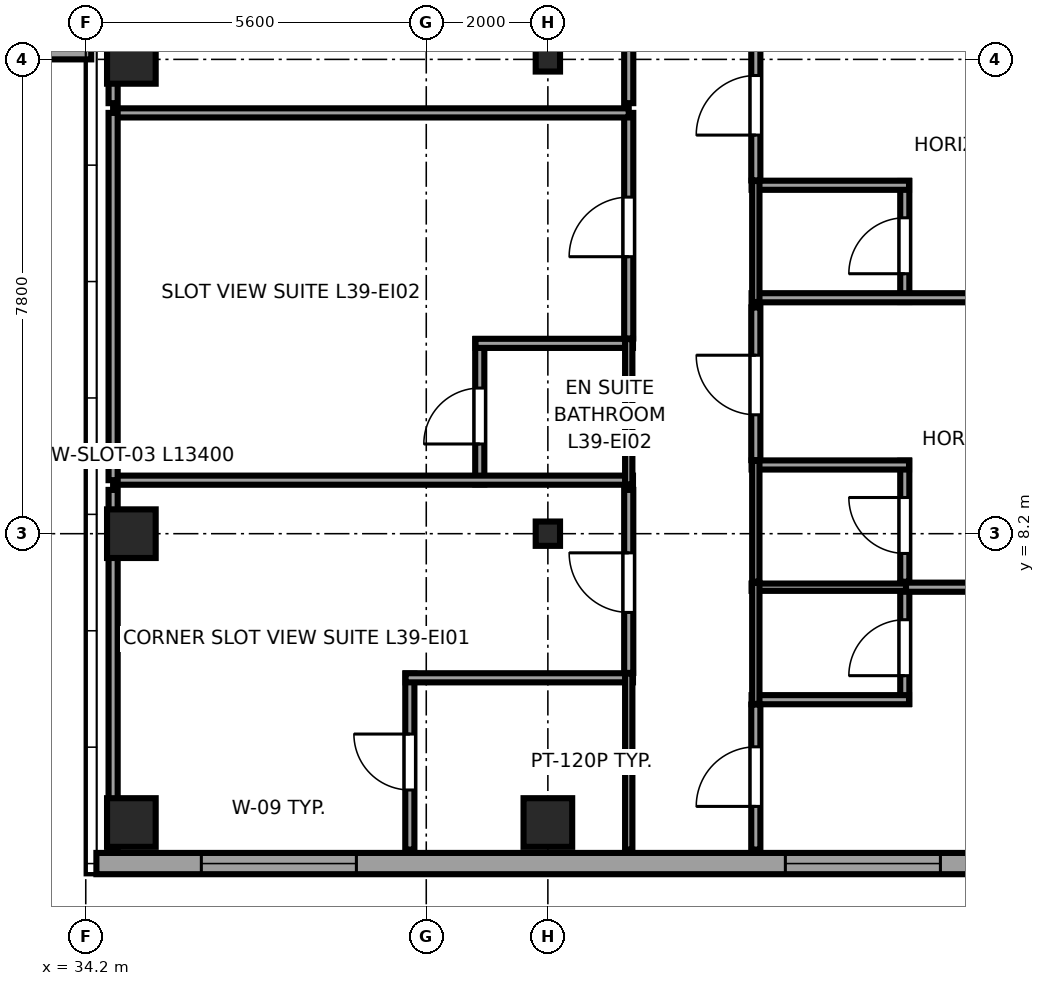
"""IFC4 building model, lengths in metres.
Left out: names, types, materials, properties, quantities, classifications, styles, units other than length and angle.
Written with IfcOpenShell. Run it as: python <this file> out.ifc"""

import sys

from ifc_helpers import new_model, si_unit, direction, frame, frame_2d, origin, origin_2d, place, context, subcontext, project, spatial, rectangle, i_section, extrude, source, transform, mapped, element, fill, save


model = new_model("IFC4")
c1 = context("Model", 3, precision=1e-05, world=origin(), true_north=direction((0.0, 1.0)))
c2 = subcontext(c1, "Body", "Model", "MODEL_VIEW")
j1 = project(units=[si_unit("LENGTHUNIT", "METRE"), si_unit("PLANEANGLEUNIT", "RADIAN")], contexts=[c1])
p1 = place(None, origin())
s1 = spatial("IfcSite", under=j1, at=p1, CompositionType="ELEMENT")
p2 = place(p1, origin())
s2 = spatial("IfcBuilding", under=s1, at=p2, CompositionType="ELEMENT")
p3 = place(p2, frame((0.0, 0.0, 150.6)))
s3 = spatial("IfcBuildingStorey", under=s2, at=p3, CompositionType="ELEMENT", Elevation=150.6)
m1 = source(origin(), c2, "Body", "SweptSolid", [
    extrude(rectangle(XDim=0.8, YDim=0.8, at=origin_2d()), origin(), (0.0, 0.0, 1.0), 3.55),
])
for number, where, z_axis, x_axis in (
    (1, (34.95, 3.45, 0.0), (0.0, 0.0, 1.0), (1.0, 0.0, 0.0)),
    (2, (34.95, 8.2, 0.0), (0.0, 0.0, 1.0), (1.0, 0.0, 0.0)),
    (3, (34.95, 16.0, 0.0), (0.0, 0.0, 1.0), (1.0, 0.0, 0.0)),
    (4, (41.8, 3.45, 0.0), (0.0, 0.0, 1.0), (1.0, 0.0, 0.0)),
):
    element("IfcColumn", number, at=place(p3, frame(where, z_axis=z_axis, x_axis=x_axis)), inside=s3, PredefinedType="COLUMN", context=c2, shape_type="MappedRepresentation", body=[
        mapped(m1, transform((0.0, 0.0, 0.0), x_axis=(1.0, 0.0, 0.0), y_axis=(0.0, 1.0, 0.0), z_axis=(0.0, 0.0, 1.0), scale=1.0)),
    ])
m2 = source(origin(), c2, "Body", "SweptSolid", [
    extrude(i_section(OverallWidth=0.4, OverallDepth=0.4, WebThickness=0.02, FlangeThickness=0.035, at=origin_2d()), origin(), (0.0, 0.0, 1.0), 3.55),
])
for number, where, z_axis, x_axis in (
    (5, (41.8, 8.2, 0.0), (0.0, 0.0, 1.0), (1.0, 0.0, 0.0)),
    (6, (41.8, 16.0, 0.0), (0.0, 0.0, 1.0), (1.0, 0.0, 0.0)),
):
    element("IfcColumn", number, at=place(p3, frame(where, z_axis=z_axis, x_axis=x_axis)), inside=s3, PredefinedType="COLUMN", context=c2, shape_type="MappedRepresentation", body=[
        mapped(m2, transform((0.0, 0.0, 0.0), x_axis=(1.0, 0.0, 0.0), y_axis=(0.0, 1.0, 0.0), z_axis=(0.0, 0.0, 1.0), scale=1.0)),
    ])
p4 = place(p3, frame((22.71, 16.175, 0.0), z_axis=(0.0, 0.0, 1.0), x_axis=(1.0, 0.0, 0.0)))
e7 = element("IfcWall", 7, at=p4, inside=s3, PredefinedType="SOLIDWALL", context=c2, shape_type="SweptSolid", body=[
    extrude(rectangle(XDim=11.58, YDim=0.35, at=frame_2d((5.79, 0.0))), origin(), (0.0, 0.0, 1.0), 2.16),
])
p5 = place(p3, frame((34.375, 2.775, 0.0), z_axis=(0.0, 0.0, 1.0), x_axis=(1.0, 0.0, 0.0)))
e8 = element("IfcWall", 8, at=p5, inside=s3, PredefinedType="SOLIDWALL", context=c2, shape_type="SweptSolid", body=[
    extrude(rectangle(XDim=15.608, YDim=0.35, at=frame_2d((7.804, 0.0))), origin(), (0.0, 0.0, 1.0), 3.37),
])
p6 = place(p5, frame((1.726, 0.0, 0.68)))
e9 = element("IfcOpeningElement", 9, at=p6, cuts=e8, PredefinedType="OPENING", context=c2, shape_type="SweptSolid", body=[
    extrude(rectangle(XDim=2.55, YDim=1.92, at=frame_2d((1.275, 0.96))), frame((0.0, 0.185, 0.0), z_axis=(0.0, -1.0, 0.0), x_axis=(1.0, 0.0, 0.0)), (0.0, 0.0, 1.0), 0.37),
])
p7 = place(p5, frame((11.331, 0.0, 0.68)))
e10 = element("IfcOpeningElement", 10, at=p7, cuts=e8, PredefinedType="OPENING", context=c2, shape_type="SweptSolid", body=[
    extrude(rectangle(XDim=2.55, YDim=1.92, at=frame_2d((1.275, 0.96))), frame((0.0, 0.185, 0.0), z_axis=(0.0, -1.0, 0.0), x_axis=(1.0, 0.0, 0.0)), (0.0, 0.0, 1.0), 0.37),
])
p8 = place(p3, frame((39.53, 3.005, 0.0), z_axis=(0.0, 0.0, 1.0), x_axis=(0.0, 1.0, 0.0)))
e11 = element("IfcWall", 11, at=p8, inside=s3, PredefinedType="PARTITIONING", context=c2, shape_type="SweptSolid", body=[
    extrude(rectangle(XDim=2.895, YDim=0.15, at=frame_2d((1.448, 0.0))), origin(), (0.0, 0.0, 1.0), 3.37),
])
p9 = place(p8, frame((0.98, 0.0, 0.0)))
e12 = element("IfcOpeningElement", 12, at=p9, cuts=e11, PredefinedType="OPENING", context=c2, shape_type="SweptSolid", body=[
    extrude(rectangle(XDim=0.92, YDim=2.01, at=frame_2d((0.46, 1.005))), frame((0.0, 0.085, 0.0), z_axis=(0.0, -1.0, 0.0), x_axis=(1.0, 0.0, 0.0)), (0.0, 0.0, 1.0), 0.17),
])
p10 = place(p3, frame((39.46, 5.83, 0.0), z_axis=(0.0, 0.0, 1.0), x_axis=(1.0, 0.0, 0.0)))
e13 = element("IfcWall", 13, at=p10, inside=s3, PredefinedType="PARTITIONING", context=c2, shape_type="SweptSolid", body=[
    extrude(rectangle(XDim=3.74, YDim=0.15, at=frame_2d((1.87, 0.0))), origin(), (0.0, 0.0, 1.0), 3.37),
])
p11 = place(p3, frame((43.13, 3.005, 0.0), z_axis=(0.0, 0.0, 1.0), x_axis=(0.0, 1.0, 0.0)))
e14 = element("IfcWall", 14, at=p11, inside=s3, PredefinedType="PLUMBINGWALL", context=c2, shape_type="SweptSolid", body=[
    extrude(rectangle(XDim=2.895, YDim=0.12, at=frame_2d((1.448, 0.0))), origin(), (0.0, 0.0, 1.0), 3.37),
])
p12 = place(p3, frame((40.68, 9.01, 0.0), z_axis=(0.0, 0.0, 1.0), x_axis=(0.0, 1.0, 0.0)))
e15 = element("IfcWall", 15, at=p12, inside=s3, PredefinedType="PARTITIONING", context=c2, shape_type="SweptSolid", body=[
    extrude(rectangle(XDim=2.39, YDim=0.15, at=frame_2d((1.195, 0.0))), origin(), (0.0, 0.0, 1.0), 3.37),
])
p13 = place(p12, frame((0.665, 0.0, 0.0)))
e16 = element("IfcOpeningElement", 16, at=p13, cuts=e15, PredefinedType="OPENING", context=c2, shape_type="SweptSolid", body=[
    extrude(rectangle(XDim=0.92, YDim=2.01, at=frame_2d((0.46, 1.005))), frame((0.0, 0.085, 0.0), z_axis=(0.0, -1.0, 0.0), x_axis=(1.0, 0.0, 0.0)), (0.0, 0.0, 1.0), 0.17),
])
p14 = place(p3, frame((34.65, 9.08, 0.0), z_axis=(0.0, 0.0, 1.0), x_axis=(1.0, 0.0, 0.0)))
e17 = element("IfcWall", 17, at=p14, inside=s3, PredefinedType="PARTITIONING", context=c2, shape_type="SweptSolid", body=[
    extrude(rectangle(XDim=8.55, YDim=0.15, at=frame_2d((4.275, 0.0))), origin(), (0.0, 0.0, 1.0), 3.37),
])
p15 = place(p3, frame((40.61, 11.33, 0.0), z_axis=(0.0, 0.0, 1.0), x_axis=(1.0, 0.0, 0.0)))
e18 = element("IfcWall", 18, at=p15, inside=s3, PredefinedType="PARTITIONING", context=c2, shape_type="SweptSolid", body=[
    extrude(rectangle(XDim=2.59, YDim=0.15, at=frame_2d((1.295, 0.0))), origin(), (0.0, 0.0, 1.0), 3.37),
])
p16 = place(p3, frame((43.13, 9.01, 0.0), z_axis=(0.0, 0.0, 1.0), x_axis=(0.0, 1.0, 0.0)))
e19 = element("IfcWall", 19, at=p16, inside=s3, PredefinedType="PLUMBINGWALL", context=c2, shape_type="SweptSolid", body=[
    extrude(rectangle(XDim=2.39, YDim=0.12, at=frame_2d((1.195, 0.0))), origin(), (0.0, 0.0, 1.0), 3.37),
])
p17 = place(p3, frame((47.67, 5.4, 0.0), z_axis=(0.0, 0.0, 1.0), x_axis=(0.0, 1.0, 0.0)))
e20 = element("IfcWall", 20, at=p17, inside=s3, PredefinedType="PARTITIONING", context=c2, shape_type="SweptSolid", body=[
    extrude(rectangle(XDim=1.99, YDim=0.15, at=frame_2d((0.995, 0.0))), origin(), (0.0, 0.0, 1.0), 3.37),
])
p18 = place(p17, frame((0.465, 0.0, 0.0)))
e21 = element("IfcOpeningElement", 21, at=p18, cuts=e20, PredefinedType="OPENING", context=c2, shape_type="SweptSolid", body=[
    extrude(rectangle(XDim=0.92, YDim=2.01, at=frame_2d((0.46, 1.005))), frame((0.0, 0.085, 0.0), z_axis=(0.0, -1.0, 0.0), x_axis=(1.0, 0.0, 0.0)), (0.0, 0.0, 1.0), 0.17),
])
p19 = place(p3, frame((45.15, 5.47, 0.0), z_axis=(0.0, 0.0, 1.0), x_axis=(1.0, 0.0, 0.0)))
e22 = element("IfcWall", 22, at=p19, inside=s3, PredefinedType="PARTITIONING", context=c2, shape_type="SweptSolid", body=[
    extrude(rectangle(XDim=2.59, YDim=0.15, at=frame_2d((1.295, 0.0))), origin(), (0.0, 0.0, 1.0), 3.37),
])
p20 = place(p3, frame((45.15, 7.32, 0.0), z_axis=(0.0, 0.0, 1.0), x_axis=(1.0, 0.0, 0.0)))
e23 = element("IfcWall", 23, at=p20, inside=s3, PredefinedType="PLUMBINGWALL", context=c2, shape_type="SweptSolid", body=[
    extrude(rectangle(XDim=2.59, YDim=0.12, at=frame_2d((1.295, 0.0))), origin(), (0.0, 0.0, 1.0), 3.37),
])
p21 = place(p3, frame((45.22, 5.4, 0.0), z_axis=(0.0, 0.0, 1.0), x_axis=(0.0, 1.0, 0.0)))
e24 = element("IfcWall", 24, at=p21, inside=s3, PredefinedType="PLUMBINGWALL", context=c2, shape_type="SweptSolid", body=[
    extrude(rectangle(XDim=1.99, YDim=0.12, at=frame_2d((0.995, 0.0))), origin(), (0.0, 0.0, 1.0), 3.37),
])
p22 = place(p3, frame((47.67, 7.41, 0.0), z_axis=(0.0, 0.0, 1.0), x_axis=(0.0, 1.0, 0.0)))
e25 = element("IfcWall", 25, at=p22, inside=s3, PredefinedType="PARTITIONING", context=c2, shape_type="SweptSolid", body=[
    extrude(rectangle(XDim=1.99, YDim=0.15, at=frame_2d((0.995, 0.0))), origin(), (0.0, 0.0, 1.0), 3.37),
])
p23 = place(p22, frame((0.465, 0.0, 0.0)))
e26 = element("IfcOpeningElement", 26, at=p23, cuts=e25, PredefinedType="OPENING", context=c2, shape_type="SweptSolid", body=[
    extrude(rectangle(XDim=0.92, YDim=2.01, at=frame_2d((0.46, 1.005))), frame((0.0, 0.085, 0.0), z_axis=(0.0, -1.0, 0.0), x_axis=(1.0, 0.0, 0.0)), (0.0, 0.0, 1.0), 0.17),
])
p24 = place(p3, frame((45.15, 9.33, 0.0), z_axis=(0.0, 0.0, 1.0), x_axis=(1.0, 0.0, 0.0)))
e27 = element("IfcWall", 27, at=p24, inside=s3, PredefinedType="PARTITIONING", context=c2, shape_type="SweptSolid", body=[
    extrude(rectangle(XDim=2.59, YDim=0.15, at=frame_2d((1.295, 0.0))), origin(), (0.0, 0.0, 1.0), 3.37),
])
p25 = place(p3, frame((45.22, 7.41, 0.0), z_axis=(0.0, 0.0, 1.0), x_axis=(0.0, 1.0, 0.0)))
e28 = element("IfcWall", 28, at=p25, inside=s3, PredefinedType="PLUMBINGWALL", context=c2, shape_type="SweptSolid", body=[
    extrude(rectangle(XDim=1.99, YDim=0.12, at=frame_2d((0.995, 0.0))), origin(), (0.0, 0.0, 1.0), 3.37),
])
p26 = place(p3, frame((47.67, 12.01, 0.0), z_axis=(0.0, 0.0, 1.0), x_axis=(0.0, 1.0, 0.0)))
e29 = element("IfcWall", 29, at=p26, inside=s3, PredefinedType="PARTITIONING", context=c2, shape_type="SweptSolid", body=[
    extrude(rectangle(XDim=1.99, YDim=0.15, at=frame_2d((0.995, 0.0))), origin(), (0.0, 0.0, 1.0), 3.37),
])
p27 = place(p26, frame((0.465, 0.0, 0.0)))
e30 = element("IfcOpeningElement", 30, at=p27, cuts=e29, PredefinedType="OPENING", context=c2, shape_type="SweptSolid", body=[
    extrude(rectangle(XDim=0.92, YDim=2.01, at=frame_2d((0.46, 1.005))), frame((0.0, 0.085, 0.0), z_axis=(0.0, -1.0, 0.0), x_axis=(1.0, 0.0, 0.0)), (0.0, 0.0, 1.0), 0.17),
])
p28 = place(p3, frame((45.15, 12.08, 0.0), z_axis=(0.0, 0.0, 1.0), x_axis=(1.0, 0.0, 0.0)))
e31 = element("IfcWall", 31, at=p28, inside=s3, PredefinedType="PARTITIONING", context=c2, shape_type="SweptSolid", body=[
    extrude(rectangle(XDim=8.845, YDim=0.15, at=frame_2d((4.423, 0.0))), origin(), (0.0, 0.0, 1.0), 3.37),
])
p29 = place(p3, frame((45.15, 13.93, 0.0), z_axis=(0.0, 0.0, 1.0), x_axis=(1.0, 0.0, 0.0)))
e32 = element("IfcWall", 32, at=p29, inside=s3, PredefinedType="PARTITIONING", context=c2, shape_type="SweptSolid", body=[
    extrude(rectangle(XDim=2.59, YDim=0.15, at=frame_2d((1.295, 0.0))), origin(), (0.0, 0.0, 1.0), 3.37),
])
p30 = place(p3, frame((45.22, 12.01, 0.0), z_axis=(0.0, 0.0, 1.0), x_axis=(0.0, 1.0, 0.0)))
e33 = element("IfcWall", 33, at=p30, inside=s3, PredefinedType="PLUMBINGWALL", context=c2, shape_type="SweptSolid", body=[
    extrude(rectangle(XDim=1.99, YDim=0.12, at=frame_2d((0.995, 0.0))), origin(), (0.0, 0.0, 1.0), 3.37),
])
p31 = place(p3, frame((43.13, 5.91, 0.0), z_axis=(0.0, 0.0, 1.0), x_axis=(0.0, 1.0, 0.0)))
e34 = element("IfcWall", 34, at=p31, inside=s3, PredefinedType="PARTITIONING", context=c2, shape_type="SweptSolid", body=[
    extrude(rectangle(XDim=3.01, YDim=0.15, at=frame_2d((1.505, 0.0))), origin(), (0.0, 0.0, 1.0), 3.37),
])
p32 = place(p31, frame((0.995, 0.0, 0.0)))
e35 = element("IfcOpeningElement", 35, at=p32, cuts=e34, PredefinedType="OPENING", context=c2, shape_type="SweptSolid", body=[
    extrude(rectangle(XDim=0.98, YDim=2.12, at=frame_2d((0.49, 1.06))), frame((0.0, 0.085, 0.0), z_axis=(0.0, -1.0, 0.0), x_axis=(1.0, 0.0, 0.0)), (0.0, 0.0, 1.0), 0.17),
])
p33 = place(p3, frame((34.65, 3.005, 0.0), z_axis=(0.0, 0.0, 1.0), x_axis=(0.0, 1.0, 0.0)))
e36 = element("IfcWall", 36, at=p33, inside=s3, PredefinedType="PARTITIONING", context=c2, shape_type="SweptSolid", body=[
    extrude(rectangle(XDim=5.915, YDim=0.15, at=frame_2d((2.958, 0.0))), origin(), (0.0, 0.0, 1.0), 2.16),
])
p34 = place(p3, frame((43.13, 11.41, 0.0), z_axis=(0.0, 0.0, 1.0), x_axis=(0.0, 1.0, 0.0)))
e37 = element("IfcWall", 37, at=p34, inside=s3, PredefinedType="PARTITIONING", context=c2, shape_type="SweptSolid", body=[
    extrude(rectangle(XDim=3.71, YDim=0.15, at=frame_2d((1.855, 0.0))), origin(), (0.0, 0.0, 1.0), 3.37),
])
p35 = place(p34, frame((1.345, 0.0, 0.0)))
e38 = element("IfcOpeningElement", 38, at=p35, cuts=e37, PredefinedType="OPENING", context=c2, shape_type="SweptSolid", body=[
    extrude(rectangle(XDim=0.98, YDim=2.12, at=frame_2d((0.49, 1.06))), frame((0.0, 0.085, 0.0), z_axis=(0.0, -1.0, 0.0), x_axis=(1.0, 0.0, 0.0)), (0.0, 0.0, 1.0), 0.17),
])
p36 = place(p3, frame((34.65, 15.12, 0.0), z_axis=(0.0, 0.0, 1.0), x_axis=(1.0, 0.0, 0.0)))
e39 = element("IfcWall", 39, at=p36, inside=s3, PredefinedType="PARTITIONING", context=c2, shape_type="SweptSolid", body=[
    extrude(rectangle(XDim=8.48, YDim=0.15, at=frame_2d((4.24, 0.0))), origin(), (0.0, 0.0, 1.0), 3.37),
])
p37 = place(p3, frame((34.65, 9.08, 0.0), z_axis=(0.0, 0.0, 1.0), x_axis=(0.0, 1.0, 0.0)))
e40 = element("IfcWall", 40, at=p37, inside=s3, PredefinedType="PARTITIONING", context=c2, shape_type="SweptSolid", body=[
    extrude(rectangle(XDim=6.04, YDim=0.15, at=frame_2d((3.02, 0.0))), origin(), (0.0, 0.0, 1.0), 2.16),
])
p38 = place(p3, frame((43.13, 15.28, 0.0), z_axis=(0.0, 0.0, 1.0), x_axis=(0.0, 1.0, 0.0)))
e41 = element("IfcWall", 41, at=p38, inside=s3, PredefinedType="PARTITIONING", context=c2, shape_type="SweptSolid", body=[
    extrude(rectangle(XDim=3.61, YDim=0.15, at=frame_2d((1.805, 0.0))), origin(), (0.0, 0.0, 1.0), 3.37),
])
p39 = place(p38, frame((1.295, 0.0, 0.0)))
e42 = element("IfcOpeningElement", 42, at=p39, cuts=e41, PredefinedType="OPENING", context=c2, shape_type="SweptSolid", body=[
    extrude(rectangle(XDim=0.98, YDim=2.12, at=frame_2d((0.49, 1.06))), frame((0.0, 0.085, 0.0), z_axis=(0.0, -1.0, 0.0), x_axis=(1.0, 0.0, 0.0)), (0.0, 0.0, 1.0), 0.17),
])
p40 = place(p3, frame((34.65, 15.28, 0.0), z_axis=(0.0, 0.0, 1.0), x_axis=(0.0, 1.0, 0.0)))
e43 = element("IfcWall", 43, at=p40, inside=s3, PredefinedType="PARTITIONING", context=c2, shape_type="SweptSolid", body=[
    extrude(rectangle(XDim=5.94, YDim=0.15, at=frame_2d((2.97, 0.0))), origin(), (0.0, 0.0, 1.0), 2.16),
])
p41 = place(p3, frame((45.22, 3.005, 0.0), z_axis=(0.0, 0.0, 1.0), x_axis=(0.0, 1.0, 0.0)))
e44 = element("IfcWall", 44, at=p41, inside=s3, PredefinedType="PARTITIONING", context=c2, shape_type="SweptSolid", body=[
    extrude(rectangle(XDim=2.385, YDim=0.15, at=frame_2d((1.192, 0.0))), origin(), (0.0, 0.0, 1.0), 3.37),
])
p42 = place(p41, frame((0.71, 0.0, 0.0)))
e45 = element("IfcOpeningElement", 45, at=p42, cuts=e44, PredefinedType="OPENING", context=c2, shape_type="SweptSolid", body=[
    extrude(rectangle(XDim=0.98, YDim=2.12, at=frame_2d((0.49, 1.06))), frame((0.0, 0.085, 0.0), z_axis=(0.0, -1.0, 0.0), x_axis=(1.0, 0.0, 0.0)), (0.0, 0.0, 1.0), 0.17),
])
p43 = place(p3, frame((47.69, 7.32, 0.0), z_axis=(0.0, 0.0, 1.0), x_axis=(1.0, 0.0, 0.0)))
e46 = element("IfcWall", 46, at=p43, inside=s3, PredefinedType="PARTITIONING", context=c2, shape_type="SweptSolid", body=[
    extrude(rectangle(XDim=6.305, YDim=0.15, at=frame_2d((3.153, 0.0))), origin(), (0.0, 0.0, 1.0), 3.37),
])
p44 = place(p3, frame((45.22, 9.41, 0.0), z_axis=(0.0, 0.0, 1.0), x_axis=(0.0, 1.0, 0.0)))
e47 = element("IfcWall", 47, at=p44, inside=s3, PredefinedType="PARTITIONING", context=c2, shape_type="SweptSolid", body=[
    extrude(rectangle(XDim=2.51, YDim=0.15, at=frame_2d((1.255, 0.0))), origin(), (0.0, 0.0, 1.0), 3.37),
])
p45 = place(p44, frame((0.745, 0.0, 0.0)))
e48 = element("IfcOpeningElement", 48, at=p45, cuts=e47, PredefinedType="OPENING", context=c2, shape_type="SweptSolid", body=[
    extrude(rectangle(XDim=0.98, YDim=2.12, at=frame_2d((0.49, 1.06))), frame((0.0, 0.085, 0.0), z_axis=(0.0, -1.0, 0.0), x_axis=(1.0, 0.0, 0.0)), (0.0, 0.0, 1.0), 0.17),
])
p46 = place(p3, frame((45.22, 14.01, 0.0), z_axis=(0.0, 0.0, 1.0), x_axis=(0.0, 1.0, 0.0)))
e49 = element("IfcWall", 49, at=p46, inside=s3, PredefinedType="PARTITIONING", context=c2, shape_type="SweptSolid", body=[
    extrude(rectangle(XDim=2.51, YDim=0.15, at=frame_2d((1.255, 0.0))), origin(), (0.0, 0.0, 1.0), 3.37),
])
p47 = place(p46, frame((0.745, 0.0, 0.0)))
e50 = element("IfcOpeningElement", 50, at=p47, cuts=e49, PredefinedType="OPENING", context=c2, shape_type="SweptSolid", body=[
    extrude(rectangle(XDim=0.98, YDim=2.12, at=frame_2d((0.49, 1.06))), frame((0.0, 0.085, 0.0), z_axis=(0.0, -1.0, 0.0), x_axis=(1.0, 0.0, 0.0)), (0.0, 0.0, 1.0), 0.17),
])
m3 = source(origin(), c2, "Body", "SweptSolid", [
    extrude(rectangle(XDim=2.55, YDim=1.92, at=frame_2d((1.275, 0.96))), frame((0.0, 0.09, 0.0), z_axis=(0.0, -1.0, 0.0), x_axis=(1.0, 0.0, 0.0)), (0.0, 0.0, 1.0), 0.06),
])
p48 = place(p6, origin())
e51 = element("IfcWindow", 51, at=p48, inside=s3, PartitioningType="TRIPLE_PANEL_HORIZONTAL", PredefinedType="WINDOW", context=c2, shape_type="MappedRepresentation", body=[
    mapped(m3, transform((0.0, 0.0, 0.0), x_axis=(1.0, 0.0, 0.0), y_axis=(0.0, 1.0, 0.0), z_axis=(0.0, 0.0, 1.0), scale=1.0)),
])
fill(e9, e51)
p49 = place(p7, origin())
e52 = element("IfcWindow", 52, at=p49, inside=s3, PartitioningType="TRIPLE_PANEL_HORIZONTAL", PredefinedType="WINDOW", context=c2, shape_type="MappedRepresentation", body=[
    mapped(m3, transform((0.0, 0.0, 0.0), x_axis=(1.0, 0.0, 0.0), y_axis=(0.0, 1.0, 0.0), z_axis=(0.0, 0.0, 1.0), scale=1.0)),
])
fill(e10, e52)
m4 = source(origin(), c2, "Body", "SweptSolid", [
    extrude(rectangle(XDim=0.92, YDim=2.01, at=frame_2d((0.46, 1.005))), frame((0.0, 0.025, 0.0), z_axis=(0.0, -1.0, 0.0), x_axis=(1.0, 0.0, 0.0)), (0.0, 0.0, 1.0), 0.05),
])
p50 = place(p9, origin())
e53 = element("IfcDoor", 53, at=p50, inside=s3, OperationType="SINGLE_SWING_RIGHT", PredefinedType="DOOR", context=c2, shape_type="MappedRepresentation", body=[
    mapped(m4, transform((0.0, 0.0, 0.0), x_axis=(1.0, 0.0, 0.0), y_axis=(0.0, 1.0, 0.0), z_axis=(0.0, 0.0, 1.0), scale=1.0)),
])
fill(e12, e53)
p51 = place(p13, origin())
e54 = element("IfcDoor", 54, at=p51, inside=s3, OperationType="SINGLE_SWING_LEFT", PredefinedType="DOOR", context=c2, shape_type="MappedRepresentation", body=[
    mapped(m4, transform((0.0, 0.0, 0.0), x_axis=(1.0, 0.0, 0.0), y_axis=(0.0, 1.0, 0.0), z_axis=(0.0, 0.0, 1.0), scale=1.0)),
])
fill(e16, e54)
p52 = place(p18, origin())
e55 = element("IfcDoor", 55, at=p52, inside=s3, OperationType="SINGLE_SWING_LEFT", PredefinedType="DOOR", context=c2, shape_type="MappedRepresentation", body=[
    mapped(m4, transform((0.0, 0.0, 0.0), x_axis=(1.0, 0.0, 0.0), y_axis=(0.0, 1.0, 0.0), z_axis=(0.0, 0.0, 1.0), scale=1.0)),
])
fill(e21, e55)
p53 = place(p23, origin())
e56 = element("IfcDoor", 56, at=p53, inside=s3, OperationType="SINGLE_SWING_RIGHT", PredefinedType="DOOR", context=c2, shape_type="MappedRepresentation", body=[
    mapped(m4, transform((0.0, 0.0, 0.0), x_axis=(1.0, 0.0, 0.0), y_axis=(0.0, 1.0, 0.0), z_axis=(0.0, 0.0, 1.0), scale=1.0)),
])
fill(e26, e56)
p54 = place(p27, origin())
e57 = element("IfcDoor", 57, at=p54, inside=s3, OperationType="SINGLE_SWING_LEFT", PredefinedType="DOOR", context=c2, shape_type="MappedRepresentation", body=[
    mapped(m4, transform((0.0, 0.0, 0.0), x_axis=(1.0, 0.0, 0.0), y_axis=(0.0, 1.0, 0.0), z_axis=(0.0, 0.0, 1.0), scale=1.0)),
])
fill(e30, e57)
m5 = source(origin(), c2, "Body", "SweptSolid", [
    extrude(rectangle(XDim=0.98, YDim=2.12, at=frame_2d((0.49, 1.06))), frame((0.0, 0.025, 0.0), z_axis=(0.0, -1.0, 0.0), x_axis=(1.0, 0.0, 0.0)), (0.0, 0.0, 1.0), 0.05),
])
p55 = place(p32, origin())
e58 = element("IfcDoor", 58, at=p55, inside=s3, OperationType="SINGLE_SWING_RIGHT", PredefinedType="DOOR", context=c2, shape_type="MappedRepresentation", body=[
    mapped(m5, transform((0.0, 0.0, 0.0), x_axis=(1.0, 0.0, 0.0), y_axis=(0.0, 1.0, 0.0), z_axis=(0.0, 0.0, 1.0), scale=1.0)),
])
fill(e35, e58)
p56 = place(p35, origin())
e59 = element("IfcDoor", 59, at=p56, inside=s3, OperationType="SINGLE_SWING_LEFT", PredefinedType="DOOR", context=c2, shape_type="MappedRepresentation", body=[
    mapped(m5, transform((0.0, 0.0, 0.0), x_axis=(1.0, 0.0, 0.0), y_axis=(0.0, 1.0, 0.0), z_axis=(0.0, 0.0, 1.0), scale=1.0)),
])
fill(e38, e59)
p57 = place(p42, origin())
e60 = element("IfcDoor", 60, at=p57, inside=s3, OperationType="SINGLE_SWING_LEFT", PredefinedType="DOOR", context=c2, shape_type="MappedRepresentation", body=[
    mapped(m5, transform((0.0, 0.0, 0.0), x_axis=(1.0, 0.0, 0.0), y_axis=(0.0, 1.0, 0.0), z_axis=(0.0, 0.0, 1.0), scale=1.0)),
])
fill(e45, e60)
p58 = place(p45, origin())
e61 = element("IfcDoor", 61, at=p58, inside=s3, OperationType="SINGLE_SWING_RIGHT", PredefinedType="DOOR", context=c2, shape_type="MappedRepresentation", body=[
    mapped(m5, transform((0.0, 0.0, 0.0), x_axis=(1.0, 0.0, 0.0), y_axis=(0.0, 1.0, 0.0), z_axis=(0.0, 0.0, 1.0), scale=1.0)),
])
fill(e48, e61)
p59 = place(p47, origin())
e62 = element("IfcDoor", 62, at=p59, inside=s3, OperationType="SINGLE_SWING_LEFT", PredefinedType="DOOR", context=c2, shape_type="MappedRepresentation", body=[
    mapped(m5, transform((0.0, 0.0, 0.0), x_axis=(1.0, 0.0, 0.0), y_axis=(0.0, 1.0, 0.0), z_axis=(0.0, 0.0, 1.0), scale=1.0)),
])
fill(e50, e62)
save(model, sys.argv[1])
